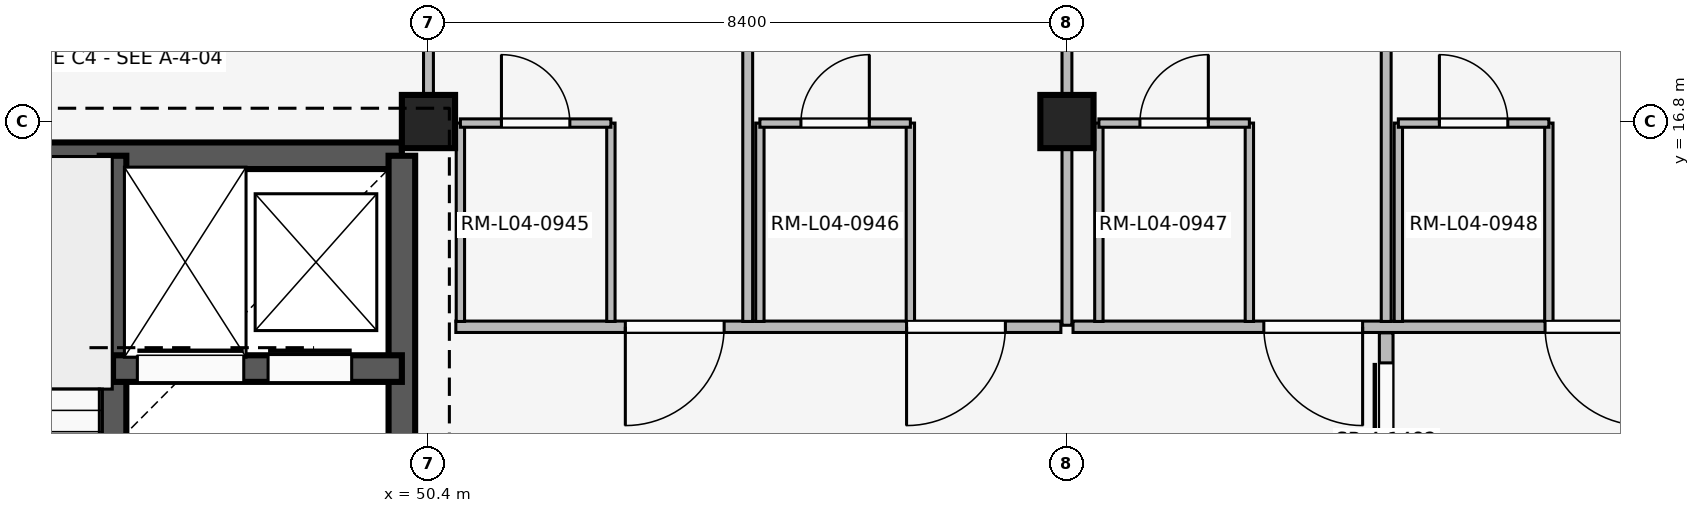
"""IFC4 building model, lengths in metres.
Left out: names, types, materials, properties, quantities, classifications, styles, units other than length and angle.
Written with IfcOpenShell. Run it as: python <this file> out.ifc"""

import sys

from ifc_helpers import new_model, si_unit, direction, frame, frame_2d, origin, origin_2d, place, context, subcontext, project, spatial, rectangle, extrude, element, fill, save


model = new_model("IFC4")
c1 = context("Model", 3, precision=1e-05, world=origin(), true_north=direction((0.0, 1.0)))
c2 = subcontext(c1, "Body", "Model", "MODEL_VIEW")
j1 = project(units=[si_unit("LENGTHUNIT", "METRE"), si_unit("PLANEANGLEUNIT", "RADIAN")], contexts=[c1])
p1 = place(None, origin())
s1 = spatial("IfcSite", under=j1, at=p1, CompositionType="ELEMENT")
p2 = place(p1, origin())
s2 = spatial("IfcBuilding", under=s1, at=p2, CompositionType="ELEMENT")
p3 = place(p2, frame((0.0, 0.0, 16.2)))
s3 = spatial("IfcBuildingStorey", under=s2, at=p3, CompositionType="ELEMENT", Elevation=16.2)
for number, where, z_axis, x_axis in (
    (1, (50.4, 16.8, 0.0), (0.0, 0.0, 1.0), (1.0, 0.0, 0.0)),
    (2, (58.8, 16.8, 0.0), (0.0, 0.0, 1.0), (1.0, 0.0, 0.0)),
):
    element("IfcColumn", number, at=place(p3, frame(where, z_axis=z_axis, x_axis=x_axis)), inside=s3, PredefinedType="COLUMN", context=c2, shape_type="SweptSolid", body=[
        extrude(rectangle(XDim=0.7, YDim=0.7, at=origin_2d()), origin(), (0.0, 0.0, 1.0), 4.2),
    ])
p4 = place(p3, frame((42.55, 16.35, 0.0), z_axis=(0.0, 0.0, 1.0), x_axis=(1.0, 0.0, 0.0)))
e3 = element("IfcWall", 3, at=p4, inside=s3, PredefinedType="SHEAR", context=c2, shape_type="SweptSolid", body=[
    extrude(rectangle(XDim=7.5, YDim=0.35, at=frame_2d((3.75, 0.0))), origin(), (0.0, 0.0, 1.0), 3.92),
])
p5 = place(p3, frame((50.05, 8.8, 0.0), z_axis=(0.0, 0.0, 1.0), x_axis=(0.0, 1.0, 0.0)))
e4 = element("IfcWall", 4, at=p5, inside=s3, PredefinedType="SHEAR", context=c2, shape_type="SweptSolid", body=[
    extrude(rectangle(XDim=7.55, YDim=0.35, at=frame_2d((3.775, 0.0))), origin(), (0.0, 0.0, 1.0), 3.92),
])
p6 = place(p5, frame((2.4, 0.0, 0.0)))
e5 = element("IfcOpeningElement", 5, at=p6, cuts=e4, PredefinedType="OPENING", context=c2, shape_type="SweptSolid", body=[
    extrude(rectangle(XDim=1.2, YDim=2.2, at=frame_2d((0.6, 1.1))), frame((0.0, 0.185, 0.0), z_axis=(0.0, -1.0, 0.0), x_axis=(1.0, 0.0, 0.0)), (0.0, 0.0, 1.0), 0.37),
])
p7 = place(p3, frame((46.25, 8.8, 0.0), z_axis=(0.0, 0.0, 1.0), x_axis=(0.0, 1.0, 0.0)))
e6 = element("IfcWall", 6, at=p7, inside=s3, PredefinedType="SHEAR", context=c2, shape_type="SweptSolid", body=[
    extrude(rectangle(XDim=7.55, YDim=0.35, at=frame_2d((3.775, 0.0))), origin(), (0.0, 0.0, 1.0), 3.92),
])
p8 = place(p7, frame((0.28, 0.0, 0.0)))
e7 = element("IfcOpeningElement", 7, at=p8, cuts=e6, PredefinedType="OPENING", context=c2, shape_type="SweptSolid", body=[
    extrude(rectangle(XDim=1.0, YDim=2.15, at=frame_2d((0.5, 1.075))), frame((0.0, 0.185, 0.0), z_axis=(0.0, -1.0, 0.0), x_axis=(1.0, 0.0, 0.0)), (0.0, 0.0, 1.0), 0.37),
])
p9 = place(p3, frame((46.25, 13.55, 0.0), z_axis=(0.0, 0.0, 1.0), x_axis=(1.0, 0.0, 0.0)))
e8 = element("IfcWall", 8, at=p9, inside=s3, PredefinedType="SHEAR", context=c2, shape_type="SweptSolid", body=[
    extrude(rectangle(XDim=3.8, YDim=0.35, at=frame_2d((1.9, 0.0))), origin(), (0.0, 0.0, 1.0), 3.92),
])
p10 = place(p9, frame((0.32, 0.0, 0.0)))
e9 = element("IfcOpeningElement", 9, at=p10, cuts=e8, PredefinedType="OPENING", context=c2, shape_type="SweptSolid", body=[
    extrude(rectangle(XDim=1.4, YDim=2.25, at=frame_2d((0.7, 1.125))), frame((0.0, 0.185, 0.0), z_axis=(0.0, -1.0, 0.0), x_axis=(1.0, 0.0, 0.0)), (0.0, 0.0, 1.0), 0.37),
])
p11 = place(p9, frame((2.04, 0.0, 0.0)))
e10 = element("IfcOpeningElement", 10, at=p11, cuts=e8, PredefinedType="OPENING", context=c2, shape_type="SweptSolid", body=[
    extrude(rectangle(XDim=1.1, YDim=2.15, at=frame_2d((0.55, 1.075))), frame((0.0, 0.185, 0.0), z_axis=(0.0, -1.0, 0.0), x_axis=(1.0, 0.0, 0.0)), (0.0, 0.0, 1.0), 0.37),
])
p12 = place(p3, frame((50.4, 17.15, 0.0), z_axis=(0.0, 0.0, 1.0), x_axis=(0.0, 1.0, 0.0)))
e11 = element("IfcWall", 11, at=p12, inside=s3, PredefinedType="PARTITIONING", context=c2, shape_type="SweptSolid", body=[
    extrude(rectangle(XDim=7.91, YDim=0.13, at=frame_2d((3.955, 0.0))), origin(), (0.0, 0.0, 1.0), 3.3),
])
p13 = place(p12, frame((3.4, 0.0, 0.0)))
e12 = element("IfcOpeningElement", 12, at=p13, cuts=e11, PredefinedType="OPENING", context=c2, shape_type="SweptSolid", body=[
    extrude(rectangle(XDim=1.05, YDim=2.2, at=frame_2d((0.525, 1.1))), frame((0.0, 0.075, 0.0), z_axis=(0.0, -1.0, 0.0), x_axis=(1.0, 0.0, 0.0)), (0.0, 0.0, 1.0), 0.15),
])
p14 = place(p3, frame((58.72, 14.1, 0.0), z_axis=(0.0, 0.0, 1.0), x_axis=(-1.0, 0.0, 0.0)))
e13 = element("IfcWall", 13, at=p14, inside=s3, PredefinedType="PARTITIONING", context=c2, shape_type="SweptSolid", body=[
    extrude(rectangle(XDim=7.96, YDim=0.15, at=frame_2d((3.98, 0.0))), origin(), (0.0, 0.0, 1.0), 3.3),
])
p15 = place(p14, frame((0.73, 0.0, 0.0)))
e14 = element("IfcOpeningElement", 14, at=p15, cuts=e13, PredefinedType="OPENING", context=c2, shape_type="SweptSolid", body=[
    extrude(rectangle(XDim=1.3, YDim=2.25, at=frame_2d((0.65, 1.125))), frame((0.0, 0.085, 0.0), z_axis=(0.0, -1.0, 0.0), x_axis=(1.0, 0.0, 0.0)), (0.0, 0.0, 1.0), 0.17),
])
p16 = place(p14, frame((4.43, 0.0, 0.0)))
e15 = element("IfcOpeningElement", 15, at=p16, cuts=e13, PredefinedType="OPENING", context=c2, shape_type="SweptSolid", body=[
    extrude(rectangle(XDim=1.3, YDim=2.25, at=frame_2d((0.65, 1.125))), frame((0.0, 0.085, 0.0), z_axis=(0.0, -1.0, 0.0), x_axis=(1.0, 0.0, 0.0)), (0.0, 0.0, 1.0), 0.17),
])
p17 = place(p3, frame((54.6, 14.17, 0.0), z_axis=(0.0, 0.0, 1.0), x_axis=(0.0, 1.0, 0.0)))
e16 = element("IfcWall", 16, at=p17, inside=s3, PredefinedType="PARTITIONING", context=c2, shape_type="SweptSolid", body=[
    extrude(rectangle(XDim=10.93, YDim=0.13, at=frame_2d((5.465, 0.0))), origin(), (0.0, 0.0, 1.0), 3.3),
])
for number, where, z_axis, x_axis in (
    (17, (50.82, 14.17, 0.0), (0.0, 0.0, 1.0), (0.0, 1.0, 0.0)),
    (18, (52.8, 14.17, 0.0), (0.0, 0.0, 1.0), (0.0, 1.0, 0.0)),
):
    element("IfcWall", number, at=place(p3, frame(where, z_axis=z_axis, x_axis=x_axis)), inside=s3, PredefinedType="PARTITIONING", context=c2, shape_type="SweptSolid", body=[
        extrude(rectangle(XDim=2.61, YDim=0.11, at=frame_2d((1.305, 0.0))), origin(), (0.0, 0.0, 1.0), 3.3),
    ])
p18 = place(p3, frame((50.82, 16.78, 0.0), z_axis=(0.0, 0.0, 1.0), x_axis=(1.0, 0.0, 0.0)))
e19 = element("IfcWall", 19, at=p18, inside=s3, PredefinedType="PARTITIONING", context=c2, shape_type="SweptSolid", body=[
    extrude(rectangle(XDim=1.98, YDim=0.11, at=frame_2d((0.99, 0.0))), origin(), (0.0, 0.0, 1.0), 3.3),
])
p19 = place(p18, frame((0.54, 0.0, 0.0)))
e20 = element("IfcOpeningElement", 20, at=p19, cuts=e19, PredefinedType="OPENING", context=c2, shape_type="SweptSolid", body=[
    extrude(rectangle(XDim=0.9, YDim=2.1, at=frame_2d((0.45, 1.05))), frame((0.0, 0.065, 0.0), z_axis=(0.0, -1.0, 0.0), x_axis=(1.0, 0.0, 0.0)), (0.0, 0.0, 1.0), 0.13),
])
for number, where, z_axis, x_axis in (
    (21, (54.76, 14.17, 0.0), (0.0, 0.0, 1.0), (0.0, 1.0, 0.0)),
    (22, (56.74, 14.17, 0.0), (0.0, 0.0, 1.0), (0.0, 1.0, 0.0)),
):
    element("IfcWall", number, at=place(p3, frame(where, z_axis=z_axis, x_axis=x_axis)), inside=s3, PredefinedType="PARTITIONING", context=c2, shape_type="SweptSolid", body=[
        extrude(rectangle(XDim=2.61, YDim=0.11, at=frame_2d((1.305, 0.0))), origin(), (0.0, 0.0, 1.0), 3.3),
    ])
p20 = place(p3, frame((54.76, 16.78, 0.0), z_axis=(0.0, 0.0, 1.0), x_axis=(1.0, 0.0, 0.0)))
e23 = element("IfcWall", 23, at=p20, inside=s3, PredefinedType="PARTITIONING", context=c2, shape_type="SweptSolid", body=[
    extrude(rectangle(XDim=1.98, YDim=0.11, at=frame_2d((0.99, 0.0))), origin(), (0.0, 0.0, 1.0), 3.3),
])
p21 = place(p20, frame((0.54, 0.0, 0.0)))
e24 = element("IfcOpeningElement", 24, at=p21, cuts=e23, PredefinedType="OPENING", context=c2, shape_type="SweptSolid", body=[
    extrude(rectangle(XDim=0.9, YDim=2.1, at=frame_2d((0.45, 1.05))), frame((0.0, 0.065, 0.0), z_axis=(0.0, -1.0, 0.0), x_axis=(1.0, 0.0, 0.0)), (0.0, 0.0, 1.0), 0.13),
])
p22 = place(p3, frame((58.8, 14.12, 0.0), z_axis=(0.0, 0.0, 1.0), x_axis=(0.0, 1.0, 0.0)))
e25 = element("IfcWall", 25, at=p22, inside=s3, PredefinedType="PARTITIONING", context=c2, shape_type="SweptSolid", body=[
    extrude(rectangle(XDim=10.94, YDim=0.13, at=frame_2d((5.47, 0.0))), origin(), (0.0, 0.0, 1.0), 3.3),
])
p23 = place(p3, frame((67.12, 14.1, 0.0), z_axis=(0.0, 0.0, 1.0), x_axis=(-1.0, 0.0, 0.0)))
e26 = element("IfcWall", 26, at=p23, inside=s3, PredefinedType="PARTITIONING", context=c2, shape_type="SweptSolid", body=[
    extrude(rectangle(XDim=8.24, YDim=0.15, at=frame_2d((4.12, 0.0))), origin(), (0.0, 0.0, 1.0), 3.3),
])
p24 = place(p23, frame((0.73, 0.0, 0.0)))
e27 = element("IfcOpeningElement", 27, at=p24, cuts=e26, PredefinedType="OPENING", context=c2, shape_type="SweptSolid", body=[
    extrude(rectangle(XDim=1.3, YDim=2.25, at=frame_2d((0.65, 1.125))), frame((0.0, 0.085, 0.0), z_axis=(0.0, -1.0, 0.0), x_axis=(1.0, 0.0, 0.0)), (0.0, 0.0, 1.0), 0.17),
])
p25 = place(p23, frame((4.43, 0.0, 0.0)))
e28 = element("IfcOpeningElement", 28, at=p25, cuts=e26, PredefinedType="OPENING", context=c2, shape_type="SweptSolid", body=[
    extrude(rectangle(XDim=1.3, YDim=2.25, at=frame_2d((0.65, 1.125))), frame((0.0, 0.085, 0.0), z_axis=(0.0, -1.0, 0.0), x_axis=(1.0, 0.0, 0.0)), (0.0, 0.0, 1.0), 0.17),
])
p26 = place(p3, frame((63.0, 14.17, 0.0), z_axis=(0.0, 0.0, 1.0), x_axis=(0.0, 1.0, 0.0)))
e29 = element("IfcWall", 29, at=p26, inside=s3, PredefinedType="PARTITIONING", context=c2, shape_type="SweptSolid", body=[
    extrude(rectangle(XDim=10.93, YDim=0.13, at=frame_2d((5.465, 0.0))), origin(), (0.0, 0.0, 1.0), 3.3),
])
for number, where, z_axis, x_axis in (
    (30, (59.22, 14.17, 0.0), (0.0, 0.0, 1.0), (0.0, 1.0, 0.0)),
    (31, (61.2, 14.17, 0.0), (0.0, 0.0, 1.0), (0.0, 1.0, 0.0)),
):
    element("IfcWall", number, at=place(p3, frame(where, z_axis=z_axis, x_axis=x_axis)), inside=s3, PredefinedType="PARTITIONING", context=c2, shape_type="SweptSolid", body=[
        extrude(rectangle(XDim=2.61, YDim=0.11, at=frame_2d((1.305, 0.0))), origin(), (0.0, 0.0, 1.0), 3.3),
    ])
p27 = place(p3, frame((59.22, 16.78, 0.0), z_axis=(0.0, 0.0, 1.0), x_axis=(1.0, 0.0, 0.0)))
e32 = element("IfcWall", 32, at=p27, inside=s3, PredefinedType="PARTITIONING", context=c2, shape_type="SweptSolid", body=[
    extrude(rectangle(XDim=1.98, YDim=0.11, at=frame_2d((0.99, 0.0))), origin(), (0.0, 0.0, 1.0), 3.3),
])
p28 = place(p27, frame((0.54, 0.0, 0.0)))
e33 = element("IfcOpeningElement", 33, at=p28, cuts=e32, PredefinedType="OPENING", context=c2, shape_type="SweptSolid", body=[
    extrude(rectangle(XDim=0.9, YDim=2.1, at=frame_2d((0.45, 1.05))), frame((0.0, 0.065, 0.0), z_axis=(0.0, -1.0, 0.0), x_axis=(1.0, 0.0, 0.0)), (0.0, 0.0, 1.0), 0.13),
])
for number, where, z_axis, x_axis in (
    (34, (63.16, 14.17, 0.0), (0.0, 0.0, 1.0), (0.0, 1.0, 0.0)),
    (35, (65.14, 14.17, 0.0), (0.0, 0.0, 1.0), (0.0, 1.0, 0.0)),
):
    element("IfcWall", number, at=place(p3, frame(where, z_axis=z_axis, x_axis=x_axis)), inside=s3, PredefinedType="PARTITIONING", context=c2, shape_type="SweptSolid", body=[
        extrude(rectangle(XDim=2.61, YDim=0.11, at=frame_2d((1.305, 0.0))), origin(), (0.0, 0.0, 1.0), 3.3),
    ])
p29 = place(p3, frame((63.16, 16.78, 0.0), z_axis=(0.0, 0.0, 1.0), x_axis=(1.0, 0.0, 0.0)))
e36 = element("IfcWall", 36, at=p29, inside=s3, PredefinedType="PARTITIONING", context=c2, shape_type="SweptSolid", body=[
    extrude(rectangle(XDim=1.98, YDim=0.11, at=frame_2d((0.99, 0.0))), origin(), (0.0, 0.0, 1.0), 3.3),
])
p30 = place(p29, frame((0.54, 0.0, 0.0)))
e37 = element("IfcOpeningElement", 37, at=p30, cuts=e36, PredefinedType="OPENING", context=c2, shape_type="SweptSolid", body=[
    extrude(rectangle(XDim=0.9, YDim=2.1, at=frame_2d((0.45, 1.05))), frame((0.0, 0.065, 0.0), z_axis=(0.0, -1.0, 0.0), x_axis=(1.0, 0.0, 0.0)), (0.0, 0.0, 1.0), 0.13),
])
p31 = place(p3, frame((63.0, 11.18, 0.0), z_axis=(0.0, 0.0, 1.0), x_axis=(0.0, 1.0, 0.0)))
e38 = element("IfcWall", 38, at=p31, inside=s3, PredefinedType="PARTITIONING", context=c2, shape_type="SweptSolid", body=[
    extrude(rectangle(XDim=2.84, YDim=0.18, at=frame_2d((1.42, 0.0))), origin(), (0.0, 0.0, 1.0), 3.3),
])
p32 = place(p31, frame((0.395, 0.0, 0.0)))
e39 = element("IfcOpeningElement", 39, at=p32, cuts=e38, PredefinedType="OPENING", context=c2, shape_type="SweptSolid", body=[
    extrude(rectangle(XDim=2.05, YDim=2.35, at=frame_2d((1.025, 1.175))), frame((0.0, 0.1, 0.0), z_axis=(0.0, -1.0, 0.0), x_axis=(1.0, 0.0, 0.0)), (0.0, 0.0, 1.0), 0.2),
])
p33 = place(p10, origin())
e40 = element("IfcDoor", 40, at=p33, inside=s3, OperationType="SLIDING_TO_LEFT", PredefinedType="DOOR", context=c2, shape_type="SweptSolid", body=[
    extrude(rectangle(XDim=1.4, YDim=2.25, at=frame_2d((0.7, 1.125))), frame((0.0, 0.025, 0.0), z_axis=(0.0, -1.0, 0.0), x_axis=(1.0, 0.0, 0.0)), (0.0, 0.0, 1.0), 0.05),
])
fill(e9, e40)
p34 = place(p11, origin())
e41 = element("IfcDoor", 41, at=p34, inside=s3, OperationType="SLIDING_TO_LEFT", PredefinedType="DOOR", context=c2, shape_type="SweptSolid", body=[
    extrude(rectangle(XDim=1.1, YDim=2.15, at=frame_2d((0.55, 1.075))), frame((0.0, 0.025, 0.0), z_axis=(0.0, -1.0, 0.0), x_axis=(1.0, 0.0, 0.0)), (0.0, 0.0, 1.0), 0.05),
])
fill(e10, e41)
p35 = place(p15, origin())
e42 = element("IfcDoor", 42, at=p35, inside=s3, OperationType="SINGLE_SWING_RIGHT", PredefinedType="DOOR", context=c2, shape_type="SweptSolid", body=[
    extrude(rectangle(XDim=1.3, YDim=2.25, at=frame_2d((0.65, 1.125))), frame((0.0, 0.025, 0.0), z_axis=(0.0, -1.0, 0.0), x_axis=(1.0, 0.0, 0.0)), (0.0, 0.0, 1.0), 0.05),
])
fill(e14, e42)
p36 = place(p16, origin())
e43 = element("IfcDoor", 43, at=p36, inside=s3, OperationType="SINGLE_SWING_RIGHT", PredefinedType="DOOR", context=c2, shape_type="SweptSolid", body=[
    extrude(rectangle(XDim=1.3, YDim=2.25, at=frame_2d((0.65, 1.125))), frame((0.0, 0.025, 0.0), z_axis=(0.0, -1.0, 0.0), x_axis=(1.0, 0.0, 0.0)), (0.0, 0.0, 1.0), 0.05),
])
fill(e15, e43)
p37 = place(p19, origin())
e44 = element("IfcDoor", 44, at=p37, inside=s3, OperationType="SINGLE_SWING_LEFT", PredefinedType="DOOR", context=c2, shape_type="SweptSolid", body=[
    extrude(rectangle(XDim=0.9, YDim=2.1, at=frame_2d((0.45, 1.05))), frame((0.0, 0.025, 0.0), z_axis=(0.0, -1.0, 0.0), x_axis=(1.0, 0.0, 0.0)), (0.0, 0.0, 1.0), 0.05),
])
fill(e20, e44)
p38 = place(p21, origin())
e45 = element("IfcDoor", 45, at=p38, inside=s3, OperationType="SINGLE_SWING_RIGHT", PredefinedType="DOOR", context=c2, shape_type="SweptSolid", body=[
    extrude(rectangle(XDim=0.9, YDim=2.1, at=frame_2d((0.45, 1.05))), frame((0.0, 0.025, 0.0), z_axis=(0.0, -1.0, 0.0), x_axis=(1.0, 0.0, 0.0)), (0.0, 0.0, 1.0), 0.05),
])
fill(e24, e45)
p39 = place(p24, origin())
e46 = element("IfcDoor", 46, at=p39, inside=s3, OperationType="SINGLE_SWING_LEFT", PredefinedType="DOOR", context=c2, shape_type="SweptSolid", body=[
    extrude(rectangle(XDim=1.3, YDim=2.25, at=frame_2d((0.65, 1.125))), frame((0.0, 0.025, 0.0), z_axis=(0.0, -1.0, 0.0), x_axis=(1.0, 0.0, 0.0)), (0.0, 0.0, 1.0), 0.05),
])
fill(e27, e46)
p40 = place(p25, origin())
e47 = element("IfcDoor", 47, at=p40, inside=s3, OperationType="SINGLE_SWING_LEFT", PredefinedType="DOOR", context=c2, shape_type="SweptSolid", body=[
    extrude(rectangle(XDim=1.3, YDim=2.25, at=frame_2d((0.65, 1.125))), frame((0.0, 0.025, 0.0), z_axis=(0.0, -1.0, 0.0), x_axis=(1.0, 0.0, 0.0)), (0.0, 0.0, 1.0), 0.05),
])
fill(e28, e47)
p41 = place(p28, origin())
e48 = element("IfcDoor", 48, at=p41, inside=s3, OperationType="SINGLE_SWING_RIGHT", PredefinedType="DOOR", context=c2, shape_type="SweptSolid", body=[
    extrude(rectangle(XDim=0.9, YDim=2.1, at=frame_2d((0.45, 1.05))), frame((0.0, 0.025, 0.0), z_axis=(0.0, -1.0, 0.0), x_axis=(1.0, 0.0, 0.0)), (0.0, 0.0, 1.0), 0.05),
])
fill(e33, e48)
p42 = place(p30, origin())
e49 = element("IfcDoor", 49, at=p42, inside=s3, OperationType="SINGLE_SWING_LEFT", PredefinedType="DOOR", context=c2, shape_type="SweptSolid", body=[
    extrude(rectangle(XDim=0.9, YDim=2.1, at=frame_2d((0.45, 1.05))), frame((0.0, 0.025, 0.0), z_axis=(0.0, -1.0, 0.0), x_axis=(1.0, 0.0, 0.0)), (0.0, 0.0, 1.0), 0.05),
])
fill(e37, e49)
p43 = place(p32, origin())
e50 = element("IfcDoor", 50, at=p43, inside=s3, OperationType="SLIDING_TO_LEFT", PredefinedType="DOOR", context=c2, shape_type="SweptSolid", body=[
    extrude(rectangle(XDim=2.05, YDim=2.35, at=frame_2d((1.025, 1.175))), frame((0.0, 0.025, 0.0), z_axis=(0.0, -1.0, 0.0), x_axis=(1.0, 0.0, 0.0)), (0.0, 0.0, 1.0), 0.05),
])
fill(e39, e50)
save(model, sys.argv[1])
